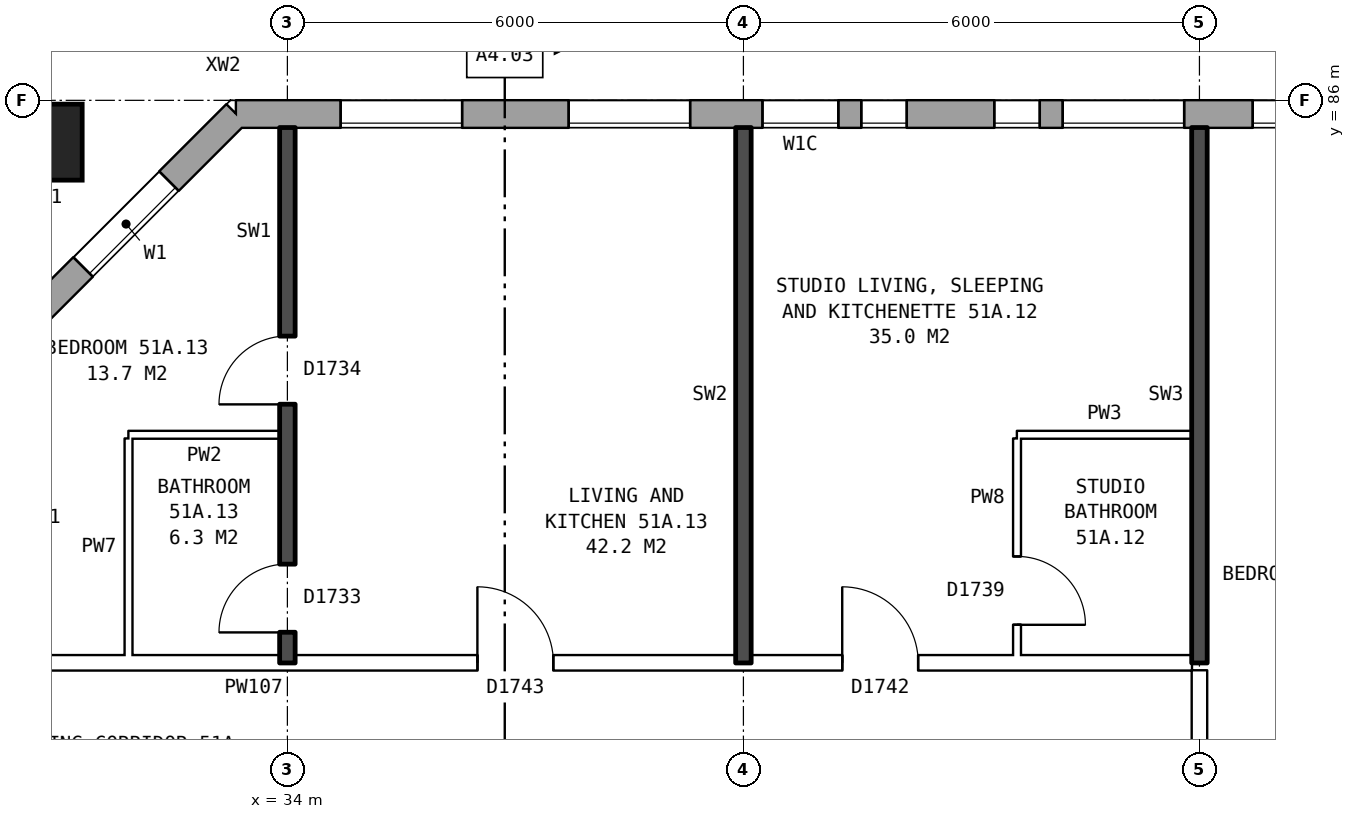
"""IFC4 building model, lengths in metres.
Left out: names, types, materials, properties, quantities, classifications, styles, units other than length and angle.
Written with IfcOpenShell. Run it as: python <this file> out.ifc"""

import sys

from ifc_helpers import new_model, si_unit, direction, frame, frame_2d, origin, origin_2d, place, context, subcontext, project, spatial, rectangle, hollow_rectangle, extrude, element, fill, save


model = new_model("IFC4")
c1 = context("Model", 3, precision=1e-05, world=origin(), true_north=direction((0.0, 1.0)))
c2 = subcontext(c1, "Body", "Model", "MODEL_VIEW")
j1 = project(units=[si_unit("LENGTHUNIT", "METRE"), si_unit("PLANEANGLEUNIT", "RADIAN")], contexts=[c1])
p1 = place(None, origin())
s1 = spatial("IfcSite", under=j1, at=p1, CompositionType="ELEMENT")
p2 = place(p1, origin())
s2 = spatial("IfcBuilding", under=s1, at=p2, CompositionType="ELEMENT")
p3 = place(p2, frame((0.0, 0.0, 182.0)))
s3 = spatial("IfcBuildingStorey", under=s2, at=p3, CompositionType="ELEMENT", Elevation=182.0)
p4 = place(p3, frame((30.8, 85.45, 0.0), z_axis=(0.0, 0.0, 1.0), x_axis=(1.0, 0.0, 0.0)))
e1 = element("IfcColumn", 1, at=p4, inside=s3, PredefinedType="COLUMN", context=c2, shape_type="SweptSolid", body=[
    extrude(hollow_rectangle(XDim=1.0, YDim=1.0, WallThickness=0.055, at=origin_2d()), origin(), (0.0, 0.0, 1.0), 3.1),
])
p5 = place(p3, frame((72.925, 85.82, 0.0), z_axis=(0.0, 0.0, 1.0), x_axis=(-1.0, 0.0, 0.0)))
e2 = element("IfcWall", 2, at=p5, inside=s3, PredefinedType="STANDARD", context=c2, shape_type="SweptSolid", body=[
    extrude(rectangle(XDim=39.601, YDim=0.36, at=frame_2d((19.8, 0.0))), origin(), (0.0, 0.0, 1.0), 2.85),
])
p6 = place(p5, frame((0.625, 0.0, 0.8)))
e3 = element("IfcOpeningElement", 3, at=p6, cuts=e2, PredefinedType="OPENING", context=c2, shape_type="SweptSolid", body=[
    extrude(rectangle(XDim=1.6, YDim=1.8, at=frame_2d((0.8, 0.9))), frame((0.0, 0.19, 0.0), z_axis=(0.0, -1.0, 0.0), x_axis=(1.0, 0.0, 0.0)), (0.0, 0.0, 1.0), 0.38),
])
p7 = place(p5, frame((3.625, 0.0, 0.8)))
e4 = element("IfcOpeningElement", 4, at=p7, cuts=e2, PredefinedType="OPENING", context=c2, shape_type="SweptSolid", body=[
    extrude(rectangle(XDim=1.6, YDim=1.8, at=frame_2d((0.8, 0.9))), frame((0.0, 0.19, 0.0), z_axis=(0.0, -1.0, 0.0), x_axis=(1.0, 0.0, 0.0)), (0.0, 0.0, 1.0), 0.38),
])
p8 = place(p5, frame((6.625, 0.0, 0.8)))
e5 = element("IfcOpeningElement", 5, at=p8, cuts=e2, PredefinedType="OPENING", context=c2, shape_type="SweptSolid", body=[
    extrude(rectangle(XDim=1.6, YDim=1.8, at=frame_2d((0.8, 0.9))), frame((0.0, 0.19, 0.0), z_axis=(0.0, -1.0, 0.0), x_axis=(1.0, 0.0, 0.0)), (0.0, 0.0, 1.0), 0.38),
])
p9 = place(p5, frame((9.475, 0.0, 0.35)))
e6 = element("IfcOpeningElement", 6, at=p9, cuts=e2, PredefinedType="OPENING", context=c2, shape_type="SweptSolid", body=[
    extrude(rectangle(XDim=0.6, YDim=0.9, at=frame_2d((0.3, 0.45))), frame((0.0, 0.19, 0.0), z_axis=(0.0, -1.0, 0.0), x_axis=(1.0, 0.0, 0.0)), (0.0, 0.0, 1.0), 0.38),
])
p10 = place(p5, frame((12.625, 0.0, 0.8)))
e7 = element("IfcOpeningElement", 7, at=p10, cuts=e2, PredefinedType="OPENING", context=c2, shape_type="SweptSolid", body=[
    extrude(rectangle(XDim=1.6, YDim=1.8, at=frame_2d((0.8, 0.9))), frame((0.0, 0.19, 0.0), z_axis=(0.0, -1.0, 0.0), x_axis=(1.0, 0.0, 0.0)), (0.0, 0.0, 1.0), 0.38),
])
p11 = place(p5, frame((15.625, 0.0, 0.8)))
e8 = element("IfcOpeningElement", 8, at=p11, cuts=e2, PredefinedType="OPENING", context=c2, shape_type="SweptSolid", body=[
    extrude(rectangle(XDim=1.6, YDim=1.8, at=frame_2d((0.8, 0.9))), frame((0.0, 0.19, 0.0), z_axis=(0.0, -1.0, 0.0), x_axis=(1.0, 0.0, 0.0)), (0.0, 0.0, 1.0), 0.38),
])
p12 = place(p5, frame((18.625, 0.0, 0.8)))
e9 = element("IfcOpeningElement", 9, at=p12, cuts=e2, PredefinedType="OPENING", context=c2, shape_type="SweptSolid", body=[
    extrude(rectangle(XDim=1.6, YDim=1.8, at=frame_2d((0.8, 0.9))), frame((0.0, 0.19, 0.0), z_axis=(0.0, -1.0, 0.0), x_axis=(1.0, 0.0, 0.0)), (0.0, 0.0, 1.0), 0.38),
])
p13 = place(p5, frame((21.625, 0.0, 0.8)))
e10 = element("IfcOpeningElement", 10, at=p13, cuts=e2, PredefinedType="OPENING", context=c2, shape_type="SweptSolid", body=[
    extrude(rectangle(XDim=1.6, YDim=1.8, at=frame_2d((0.8, 0.9))), frame((0.0, 0.19, 0.0), z_axis=(0.0, -1.0, 0.0), x_axis=(1.0, 0.0, 0.0)), (0.0, 0.0, 1.0), 0.38),
])
p14 = place(p5, frame((24.625, 0.0, 0.8)))
e11 = element("IfcOpeningElement", 11, at=p14, cuts=e2, PredefinedType="OPENING", context=c2, shape_type="SweptSolid", body=[
    extrude(rectangle(XDim=1.6, YDim=1.8, at=frame_2d((0.8, 0.9))), frame((0.0, 0.19, 0.0), z_axis=(0.0, -1.0, 0.0), x_axis=(1.0, 0.0, 0.0)), (0.0, 0.0, 1.0), 0.38),
])
p15 = place(p5, frame((27.125, 0.0, 0.8)))
e12 = element("IfcOpeningElement", 12, at=p15, cuts=e2, PredefinedType="OPENING", context=c2, shape_type="SweptSolid", body=[
    extrude(rectangle(XDim=1.6, YDim=1.8, at=frame_2d((0.8, 0.9))), frame((0.0, 0.19, 0.0), z_axis=(0.0, -1.0, 0.0), x_axis=(1.0, 0.0, 0.0)), (0.0, 0.0, 1.0), 0.38),
])
p16 = place(p5, frame((29.025, 0.0, 0.8)))
e13 = element("IfcOpeningElement", 13, at=p16, cuts=e2, PredefinedType="OPENING", context=c2, shape_type="SweptSolid", body=[
    extrude(rectangle(XDim=0.6, YDim=0.9, at=frame_2d((0.3, 0.45))), frame((0.0, 0.19, 0.0), z_axis=(0.0, -1.0, 0.0), x_axis=(1.0, 0.0, 0.0)), (0.0, 0.0, 1.0), 0.38),
])
p17 = place(p5, frame((33.625, 0.0, 0.8)))
e14 = element("IfcOpeningElement", 14, at=p17, cuts=e2, PredefinedType="OPENING", context=c2, shape_type="SweptSolid", body=[
    extrude(rectangle(XDim=1.6, YDim=1.8, at=frame_2d((0.8, 0.9))), frame((0.0, 0.19, 0.0), z_axis=(0.0, -1.0, 0.0), x_axis=(1.0, 0.0, 0.0)), (0.0, 0.0, 1.0), 0.38),
])
p18 = place(p5, frame((36.625, 0.0, 0.8)))
e15 = element("IfcOpeningElement", 15, at=p18, cuts=e2, PredefinedType="OPENING", context=c2, shape_type="SweptSolid", body=[
    extrude(rectangle(XDim=1.6, YDim=1.8, at=frame_2d((0.8, 0.9))), frame((0.0, 0.19, 0.0), z_axis=(0.0, -1.0, 0.0), x_axis=(1.0, 0.0, 0.0)), (0.0, 0.0, 1.0), 0.38),
])
p19 = place(p5, frame((10.375, 0.0, 0.35)))
e16 = element("IfcOpeningElement", 16, at=p19, cuts=e2, PredefinedType="OPENING", context=c2, shape_type="SweptSolid", body=[
    extrude(rectangle(XDim=1.4, YDim=1.8, at=frame_2d((0.7, 0.9))), frame((0.0, 0.19, 0.0), z_axis=(0.0, -1.0, 0.0), x_axis=(1.0, 0.0, 0.0)), (0.0, 0.0, 1.0), 0.38),
])
p20 = place(p5, frame((30.775, 0.0, 1.7)))
e17 = element("IfcOpeningElement", 17, at=p20, cuts=e2, PredefinedType="OPENING", context=c2, shape_type="SweptSolid", body=[
    extrude(rectangle(XDim=0.6, YDim=0.9, at=frame_2d((0.3, 0.45))), frame((0.0, 0.19, 0.0), z_axis=(0.0, -1.0, 0.0), x_axis=(1.0, 0.0, 0.0)), (0.0, 0.0, 1.0), 0.38),
])
p21 = place(p5, frame((31.675, 0.0, 0.8)))
e18 = element("IfcOpeningElement", 18, at=p21, cuts=e2, PredefinedType="OPENING", context=c2, shape_type="SweptSolid", body=[
    extrude(rectangle(XDim=1.0, YDim=1.8, at=frame_2d((0.5, 0.9))), frame((0.0, 0.19, 0.0), z_axis=(0.0, -1.0, 0.0), x_axis=(1.0, 0.0, 0.0)), (0.0, 0.0, 1.0), 0.38),
])
p22 = place(p3, frame((33.325, 85.82, 0.0), z_axis=(0.0, 0.0, 1.0), x_axis=(-0.707106781187, -0.707106781187, 0.0)))
e19 = element("IfcWall", 19, at=p22, inside=s3, PredefinedType="STANDARD", context=c2, shape_type="SweptSolid", body=[
    extrude(rectangle(XDim=4.094, YDim=0.36, at=frame_2d((2.047, 0.0))), origin(), (0.0, 0.0, 1.0), 2.85),
])
p23 = place(p22, frame((1.247, 0.0, 0.8)))
e20 = element("IfcOpeningElement", 20, at=p23, cuts=e19, PredefinedType="OPENING", context=c2, shape_type="SweptSolid", body=[
    extrude(rectangle(XDim=1.6, YDim=1.8, at=frame_2d((0.8, 0.9))), frame((0.0, 0.19, 0.0), z_axis=(0.0, -1.0, 0.0), x_axis=(1.0, 0.0, 0.0)), (0.0, 0.0, 1.0), 0.38),
])
p24 = place(p3, frame((30.61, 78.6, 0.0), z_axis=(0.0, 0.0, 1.0), x_axis=(1.0, 0.0, 0.0)))
e21 = element("IfcWall", 21, at=p24, inside=s3, PredefinedType="PARTITIONING", context=c2, shape_type="SweptSolid", body=[
    extrude(rectangle(XDim=15.29, YDim=0.2, at=frame_2d((7.645, 0.0))), origin(), (0.0, 0.0, 1.0), 2.85),
])
p25 = place(p24, frame((10.69, 0.0, 0.0)))
e22 = element("IfcOpeningElement", 22, at=p25, cuts=e21, PredefinedType="OPENING", context=c2, shape_type="SweptSolid", body=[
    extrude(rectangle(XDim=1.0, YDim=2.1, at=frame_2d((0.5, 1.05))), frame((0.0, 0.11, 0.0), z_axis=(0.0, -1.0, 0.0), x_axis=(1.0, 0.0, 0.0)), (0.0, 0.0, 1.0), 0.22),
])
p26 = place(p24, frame((5.89, 0.0, 0.0)))
e23 = element("IfcOpeningElement", 23, at=p26, cuts=e21, PredefinedType="OPENING", context=c2, shape_type="SweptSolid", body=[
    extrude(rectangle(XDim=1.0, YDim=2.1, at=frame_2d((0.5, 1.05))), frame((0.0, 0.11, 0.0), z_axis=(0.0, -1.0, 0.0), x_axis=(1.0, 0.0, 0.0)), (0.0, 0.0, 1.0), 0.22),
])
p27 = place(p3, frame((31.91, 81.6, 0.0), z_axis=(0.0, 0.0, 1.0), x_axis=(1.0, 0.0, 0.0)))
e24 = element("IfcWall", 24, at=p27, inside=s3, PredefinedType="PARTITIONING", context=c2, shape_type="SweptSolid", body=[
    extrude(rectangle(XDim=1.99, YDim=0.1, at=frame_2d((0.995, 0.0))), origin(), (0.0, 0.0, 1.0), 2.85),
])
p28 = place(p3, frame((43.6, 81.6, 0.0), z_axis=(0.0, 0.0, 1.0), x_axis=(1.0, 0.0, 0.0)))
e25 = element("IfcWall", 25, at=p28, inside=s3, PredefinedType="PARTITIONING", context=c2, shape_type="SweptSolid", body=[
    extrude(rectangle(XDim=2.3, YDim=0.1, at=frame_2d((1.15, 0.0))), origin(), (0.0, 0.0, 1.0), 2.85),
])
p29 = place(p3, frame((31.91, 78.7, 0.0), z_axis=(0.0, 0.0, 1.0), x_axis=(0.0, 1.0, 0.0)))
e26 = element("IfcWall", 26, at=p29, inside=s3, PredefinedType="PARTITIONING", context=c2, shape_type="SweptSolid", body=[
    extrude(rectangle(XDim=2.85, YDim=0.1, at=frame_2d((1.425, 0.0))), origin(), (0.0, 0.0, 1.0), 2.85),
])
p30 = place(p3, frame((34.0, 78.6, 0.0), z_axis=(0.0, 0.0, 1.0), x_axis=(0.0, 1.0, 0.0)))
e27 = element("IfcWall", 27, at=p30, inside=s3, PredefinedType="SOLIDWALL", context=c2, shape_type="SweptSolid", body=[
    extrude(rectangle(XDim=7.04, YDim=0.2, at=frame_2d((3.52, 0.0))), origin(), (0.0, 0.0, 1.0), 2.85),
])
p31 = place(p30, frame((3.4, 0.0, 0.0)))
e28 = element("IfcOpeningElement", 28, at=p31, cuts=e27, PredefinedType="OPENING", context=c2, shape_type="SweptSolid", body=[
    extrude(rectangle(XDim=0.9, YDim=2.1, at=frame_2d((0.45, 1.05))), frame((0.0, 0.11, 0.0), z_axis=(0.0, -1.0, 0.0), x_axis=(1.0, 0.0, 0.0)), (0.0, 0.0, 1.0), 0.22),
])
p32 = place(p30, frame((0.4, 0.0, 0.0)))
e29 = element("IfcOpeningElement", 29, at=p32, cuts=e27, PredefinedType="OPENING", context=c2, shape_type="SweptSolid", body=[
    extrude(rectangle(XDim=0.9, YDim=2.1, at=frame_2d((0.45, 1.05))), frame((0.0, 0.11, 0.0), z_axis=(0.0, -1.0, 0.0), x_axis=(1.0, 0.0, 0.0)), (0.0, 0.0, 1.0), 0.22),
])
p33 = place(p3, frame((40.0, 78.6, 0.0), z_axis=(0.0, 0.0, 1.0), x_axis=(0.0, 1.0, 0.0)))
e30 = element("IfcWall", 30, at=p33, inside=s3, PredefinedType="SOLIDWALL", context=c2, shape_type="SweptSolid", body=[
    extrude(rectangle(XDim=7.04, YDim=0.2, at=frame_2d((3.52, 0.0))), origin(), (0.0, 0.0, 1.0), 2.85),
])
p34 = place(p3, frame((43.6, 78.7, 0.0), z_axis=(0.0, 0.0, 1.0), x_axis=(0.0, 1.0, 0.0)))
e31 = element("IfcWall", 31, at=p34, inside=s3, PredefinedType="PARTITIONING", context=c2, shape_type="SweptSolid", body=[
    extrude(rectangle(XDim=2.85, YDim=0.1, at=frame_2d((1.425, 0.0))), origin(), (0.0, 0.0, 1.0), 2.85),
])
p35 = place(p34, frame((0.4, 0.0, 0.0)))
e32 = element("IfcOpeningElement", 32, at=p35, cuts=e31, PredefinedType="OPENING", context=c2, shape_type="SweptSolid", body=[
    extrude(rectangle(XDim=0.9, YDim=2.1, at=frame_2d((0.45, 1.05))), frame((0.0, 0.06, 0.0), z_axis=(0.0, -1.0, 0.0), x_axis=(1.0, 0.0, 0.0)), (0.0, 0.0, 1.0), 0.12),
])
p36 = place(p3, frame((46.0, 76.3, 0.0), z_axis=(0.0, 0.0, 1.0), x_axis=(0.0, 1.0, 0.0)))
e33 = element("IfcWall", 33, at=p36, inside=s3, PredefinedType="PARTITIONING", context=c2, shape_type="SweptSolid", body=[
    extrude(rectangle(XDim=2.2, YDim=0.2, at=frame_2d((1.1, 0.0))), origin(), (0.0, 0.0, 1.0), 2.85),
])
p37 = place(p3, frame((46.0, 78.6, 0.0), z_axis=(0.0, 0.0, 1.0), x_axis=(0.0, 1.0, 0.0)))
e34 = element("IfcWall", 34, at=p37, inside=s3, PredefinedType="SOLIDWALL", context=c2, shape_type="SweptSolid", body=[
    extrude(rectangle(XDim=7.04, YDim=0.2, at=frame_2d((3.52, 0.0))), origin(), (0.0, 0.0, 1.0), 2.85),
])
p38 = place(p14, origin())
e35 = element("IfcWindow", 35, at=p38, inside=s3, PartitioningType="SINGLE_PANEL", PredefinedType="WINDOW", context=c2, shape_type="SweptSolid", body=[
    extrude(rectangle(XDim=1.6, YDim=1.8, at=frame_2d((0.8, 0.9))), frame((0.0, 0.15, 0.0), z_axis=(0.0, -1.0, 0.0), x_axis=(1.0, 0.0, 0.0)), (0.0, 0.0, 1.0), 0.06),
])
fill(e11, e35)
p39 = place(p15, origin())
e36 = element("IfcWindow", 36, at=p39, inside=s3, PartitioningType="SINGLE_PANEL", PredefinedType="WINDOW", context=c2, shape_type="SweptSolid", body=[
    extrude(rectangle(XDim=1.6, YDim=1.8, at=frame_2d((0.8, 0.9))), frame((0.0, 0.15, 0.0), z_axis=(0.0, -1.0, 0.0), x_axis=(1.0, 0.0, 0.0)), (0.0, 0.0, 1.0), 0.06),
])
fill(e12, e36)
p40 = place(p16, origin())
e37 = element("IfcWindow", 37, at=p40, inside=s3, PartitioningType="SINGLE_PANEL", PredefinedType="WINDOW", context=c2, shape_type="SweptSolid", body=[
    extrude(rectangle(XDim=0.6, YDim=0.9, at=frame_2d((0.3, 0.45))), frame((0.0, 0.15, 0.0), z_axis=(0.0, -1.0, 0.0), x_axis=(1.0, 0.0, 0.0)), (0.0, 0.0, 1.0), 0.06),
])
fill(e13, e37)
p41 = place(p17, origin())
e38 = element("IfcWindow", 38, at=p41, inside=s3, PartitioningType="SINGLE_PANEL", PredefinedType="WINDOW", context=c2, shape_type="SweptSolid", body=[
    extrude(rectangle(XDim=1.6, YDim=1.8, at=frame_2d((0.8, 0.9))), frame((0.0, 0.15, 0.0), z_axis=(0.0, -1.0, 0.0), x_axis=(1.0, 0.0, 0.0)), (0.0, 0.0, 1.0), 0.06),
])
fill(e14, e38)
p42 = place(p18, origin())
e39 = element("IfcWindow", 39, at=p42, inside=s3, PartitioningType="SINGLE_PANEL", PredefinedType="WINDOW", context=c2, shape_type="SweptSolid", body=[
    extrude(rectangle(XDim=1.6, YDim=1.8, at=frame_2d((0.8, 0.9))), frame((0.0, 0.15, 0.0), z_axis=(0.0, -1.0, 0.0), x_axis=(1.0, 0.0, 0.0)), (0.0, 0.0, 1.0), 0.06),
])
fill(e15, e39)
p43 = place(p23, origin())
e40 = element("IfcWindow", 40, at=p43, inside=s3, PartitioningType="SINGLE_PANEL", PredefinedType="WINDOW", context=c2, shape_type="SweptSolid", body=[
    extrude(rectangle(XDim=1.6, YDim=1.8, at=frame_2d((0.8, 0.9))), frame((0.0, 0.15, 0.0), z_axis=(0.0, -1.0, 0.0), x_axis=(1.0, 0.0, 0.0)), (0.0, 0.0, 1.0), 0.06),
])
fill(e20, e40)
p44 = place(p25, origin())
e41 = element("IfcDoor", 41, at=p44, inside=s3, OperationType="SINGLE_SWING_LEFT", PredefinedType="DOOR", context=c2, shape_type="SweptSolid", body=[
    extrude(rectangle(XDim=1.0, YDim=2.1, at=frame_2d((0.5, 1.05))), frame((0.0, 0.025, 0.0), z_axis=(0.0, -1.0, 0.0), x_axis=(1.0, 0.0, 0.0)), (0.0, 0.0, 1.0), 0.05),
])
fill(e22, e41)
p45 = place(p35, frame((0.9, 0.0, 0.0), z_axis=(0.0, 0.0, 1.0), x_axis=(-1.0, 0.0, 0.0)))
e42 = element("IfcDoor", 42, at=p45, inside=s3, OperationType="SINGLE_SWING_RIGHT", PredefinedType="DOOR", context=c2, shape_type="SweptSolid", body=[
    extrude(rectangle(XDim=0.9, YDim=2.1, at=frame_2d((0.45, 1.05))), frame((0.0, 0.025, 0.0), z_axis=(0.0, -1.0, 0.0), x_axis=(1.0, 0.0, 0.0)), (0.0, 0.0, 1.0), 0.05),
])
fill(e32, e42)
p46 = place(p31, origin())
e43 = element("IfcDoor", 43, at=p46, inside=s3, OperationType="SINGLE_SWING_LEFT", PredefinedType="DOOR", context=c2, shape_type="SweptSolid", body=[
    extrude(rectangle(XDim=0.9, YDim=2.1, at=frame_2d((0.45, 1.05))), frame((0.0, 0.025, 0.0), z_axis=(0.0, -1.0, 0.0), x_axis=(1.0, 0.0, 0.0)), (0.0, 0.0, 1.0), 0.05),
])
fill(e28, e43)
p47 = place(p26, origin())
e44 = element("IfcDoor", 44, at=p47, inside=s3, OperationType="SINGLE_SWING_LEFT", PredefinedType="DOOR", context=c2, shape_type="SweptSolid", body=[
    extrude(rectangle(XDim=1.0, YDim=2.1, at=frame_2d((0.5, 1.05))), frame((0.0, 0.025, 0.0), z_axis=(0.0, -1.0, 0.0), x_axis=(1.0, 0.0, 0.0)), (0.0, 0.0, 1.0), 0.05),
])
fill(e23, e44)
p48 = place(p32, origin())
e45 = element("IfcDoor", 45, at=p48, inside=s3, OperationType="SINGLE_SWING_LEFT", PredefinedType="DOOR", context=c2, shape_type="SweptSolid", body=[
    extrude(rectangle(XDim=0.9, YDim=2.1, at=frame_2d((0.45, 1.05))), frame((0.0, 0.025, 0.0), z_axis=(0.0, -1.0, 0.0), x_axis=(1.0, 0.0, 0.0)), (0.0, 0.0, 1.0), 0.05),
])
fill(e29, e45)
p49 = place(p20, origin())
e46 = element("IfcWindow", 46, at=p49, inside=s3, PartitioningType="SINGLE_PANEL", PredefinedType="WINDOW", context=c2, shape_type="SweptSolid", body=[
    extrude(rectangle(XDim=0.6, YDim=0.9, at=frame_2d((0.3, 0.45))), frame((0.0, 0.15, 0.0), z_axis=(0.0, -1.0, 0.0), x_axis=(1.0, 0.0, 0.0)), (0.0, 0.0, 1.0), 0.06),
])
fill(e17, e46)
p50 = place(p21, origin())
e47 = element("IfcWindow", 47, at=p50, inside=s3, PartitioningType="SINGLE_PANEL", PredefinedType="WINDOW", context=c2, shape_type="SweptSolid", body=[
    extrude(rectangle(XDim=1.0, YDim=1.8, at=frame_2d((0.5, 0.9))), frame((0.0, 0.15, 0.0), z_axis=(0.0, -1.0, 0.0), x_axis=(1.0, 0.0, 0.0)), (0.0, 0.0, 1.0), 0.06),
])
fill(e18, e47)
save(model, sys.argv[1])
